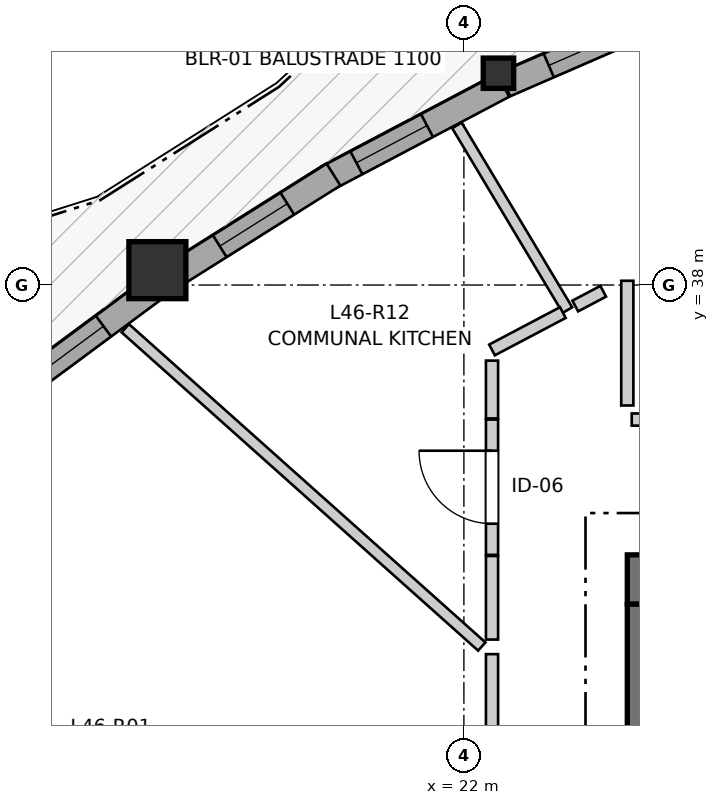
"""IFC4 building model, lengths in metres.
Left out: names, types, materials, properties, quantities, classifications, styles, units other than length and angle.
Written with IfcOpenShell. Run it as: python <this file> out.ifc"""

import sys

from ifc_helpers import new_model, si_unit, direction, frame, frame_2d, origin, origin_2d, place, context, subcontext, project, spatial, rectangle, i_section, extrude, source, transform, mapped, element, fill, save


model = new_model("IFC4")
c1 = context("Model", 3, precision=1e-05, world=origin(), true_north=direction((0.0, 1.0)))
c2 = subcontext(c1, "Body", "Model", "MODEL_VIEW")
j1 = project(units=[si_unit("LENGTHUNIT", "METRE"), si_unit("PLANEANGLEUNIT", "RADIAN")], contexts=[c1])
p1 = place(None, origin())
s1 = spatial("IfcSite", under=j1, at=p1, CompositionType="ELEMENT")
p2 = place(p1, origin())
s2 = spatial("IfcBuilding", under=s1, at=p2, CompositionType="ELEMENT")
p3 = place(p2, frame((0.0, 0.0, 155.4)))
s3 = spatial("IfcBuildingStorey", under=s2, at=p3, CompositionType="ELEMENT", Elevation=155.4)
p4 = place(p3, frame((36.55, 34.125, 0.0), z_axis=(0.0, 0.0, 1.0), x_axis=(-1.0, 0.0, 0.0)))
e1 = element("IfcWall", 1, at=p4, inside=s3, PredefinedType="SHEAR", context=c2, shape_type="SweptSolid", body=[
    extrude(rectangle(XDim=12.4, YDim=0.65, at=frame_2d((6.2, 0.0))), origin(), (0.0, 0.0, 1.0), 2.935),
])
p5 = place(p3, frame((24.475, 33.8, 0.0), z_axis=(0.0, 0.0, 1.0), x_axis=(0.0, -1.0, 0.0)))
e2 = element("IfcWall", 2, at=p5, inside=s3, PredefinedType="SHEAR", context=c2, shape_type="SweptSolid", body=[
    extrude(rectangle(XDim=15.6, YDim=0.65, at=frame_2d((7.8, 0.0))), origin(), (0.0, 0.0, 1.0), 2.935),
])
p6 = place(p5, frame((7.05, 0.0, 0.0)))
e3 = element("IfcOpeningElement", 3, at=p6, cuts=e2, PredefinedType="OPENING", context=c2, shape_type="SweptSolid", body=[
    extrude(rectangle(XDim=1.5, YDim=2.15, at=frame_2d((0.75, 1.075))), frame((0.0, 0.335, 0.0), z_axis=(0.0, -1.0, 0.0), x_axis=(1.0, 0.0, 0.0)), (0.0, 0.0, 1.0), 0.67),
])
p7 = place(p5, frame((3.52, 0.0, 0.0)))
e4 = element("IfcOpeningElement", 4, at=p7, cuts=e2, PredefinedType="OPENING", context=c2, shape_type="SweptSolid", body=[
    extrude(rectangle(XDim=0.86, YDim=2.05, at=frame_2d((0.43, 1.025))), frame((0.0, 0.335, 0.0), z_axis=(0.0, -1.0, 0.0), x_axis=(1.0, 0.0, 0.0)), (0.0, 0.0, 1.0), 0.67),
])
p8 = place(p5, frame((11.22, 0.0, 0.0)))
e5 = element("IfcOpeningElement", 5, at=p8, cuts=e2, PredefinedType="OPENING", context=c2, shape_type="SweptSolid", body=[
    extrude(rectangle(XDim=0.86, YDim=2.05, at=frame_2d((0.43, 1.025))), frame((0.0, 0.335, 0.0), z_axis=(0.0, -1.0, 0.0), x_axis=(1.0, 0.0, 0.0)), (0.0, 0.0, 1.0), 0.67),
])
m1 = source(origin(), c2, "Body", "SweptSolid", [
    extrude(i_section(OverallWidth=0.401, OverallDepth=0.399, WebThickness=0.023, FlangeThickness=0.036, FilletRadius=0.015, at=origin_2d()), origin(), (0.0, 0.0, 1.0), 2.935),
])
p9 = place(p3, frame((22.455, 40.786, 0.0), z_axis=(0.0, 0.0, 1.0), x_axis=(1.0, 0.0, 0.0)))
e6 = element("IfcColumn", 6, at=p9, inside=s3, PredefinedType="PILASTER", context=c2, shape_type="MappedRepresentation", body=[
    mapped(m1, transform((0.0, 0.0, 0.0), x_axis=(1.0, 0.0, 0.0), y_axis=(0.0, 1.0, 0.0), z_axis=(0.0, 0.0, 1.0), scale=1.0)),
])
m2 = source(origin(), c2, "Body", "SweptSolid", [
    extrude(rectangle(XDim=0.75, YDim=0.75, at=origin_2d()), origin(), (0.0, 0.0, 1.0), 2.935),
])
p10 = place(p3, frame((17.967, 38.195, 0.0), z_axis=(0.0, 0.0, 1.0), x_axis=(1.0, 0.0, 0.0)))
e7 = element("IfcColumn", 7, at=p10, inside=s3, PredefinedType="COLUMN", context=c2, shape_type="MappedRepresentation", body=[
    mapped(m2, transform((0.0, 0.0, 0.0), x_axis=(1.0, 0.0, 0.0), y_axis=(0.0, 1.0, 0.0), z_axis=(0.0, 0.0, 1.0), scale=1.0)),
])
p11 = place(p3, frame((24.949, 41.685, 0.0), z_axis=(0.0, 0.0, 1.0), x_axis=(-0.917112921707, -0.398627506373, 0.0)))
e8 = element("IfcWall", 8, at=p11, inside=s3, PredefinedType="SOLIDWALL", context=c2, shape_type="SweptSolid", body=[
    extrude(rectangle(XDim=2.625, YDim=0.34, at=frame_2d((1.313, 0.0))), origin(), (0.0, 0.0, 1.0), 2.515),
])
p12 = place(p11, frame((0.648, 0.0, 0.82)))
e9 = element("IfcOpeningElement", 9, at=p12, cuts=e8, PredefinedType="OPENING", context=c2, shape_type="SweptSolid", body=[
    extrude(rectangle(XDim=1.35, YDim=1.45, at=frame_2d((0.675, 0.725))), frame((0.0, 0.18, 0.0), z_axis=(0.0, -1.0, 0.0), x_axis=(1.0, 0.0, 0.0)), (0.0, 0.0, 1.0), 0.36),
])
p13 = place(p3, frame((22.517, 40.627, 0.0), z_axis=(0.0, 0.0, 1.0), x_axis=(-0.884374030812, -0.466778934427, 0.0)))
e10 = element("IfcWall", 10, at=p13, inside=s3, PredefinedType="SOLIDWALL", context=c2, shape_type="SweptSolid", body=[
    extrude(rectangle(XDim=2.611, YDim=0.34, at=frame_2d((1.306, 0.0))), origin(), (0.0, 0.0, 1.0), 2.515),
])
p14 = place(p13, frame((1.133, 0.0, 0.82)))
e11 = element("IfcOpeningElement", 11, at=p14, cuts=e10, PredefinedType="OPENING", context=c2, shape_type="SweptSolid", body=[
    extrude(rectangle(XDim=1.05, YDim=1.45, at=frame_2d((0.525, 0.725))), frame((0.0, 0.18, 0.0), z_axis=(0.0, -1.0, 0.0), x_axis=(1.0, 0.0, 0.0)), (0.0, 0.0, 1.0), 0.36),
])
p15 = place(p3, frame((20.284, 39.452, 0.0), z_axis=(0.0, 0.0, 1.0), x_axis=(-0.846415587119, -0.532522913951, 0.0)))
e12 = element("IfcWall", 12, at=p15, inside=s3, PredefinedType="SOLIDWALL", context=c2, shape_type="SweptSolid", body=[
    extrude(rectangle(XDim=2.476, YDim=0.34, at=frame_2d((1.238, 0.0))), origin(), (0.0, 0.0, 1.0), 2.515),
])
p16 = place(p15, frame((0.718, 0.0, 0.82)))
e13 = element("IfcOpeningElement", 13, at=p16, cuts=e12, PredefinedType="OPENING", context=c2, shape_type="SweptSolid", body=[
    extrude(rectangle(XDim=1.05, YDim=1.45, at=frame_2d((0.525, 0.725))), frame((0.0, 0.18, 0.0), z_axis=(0.0, -1.0, 0.0), x_axis=(1.0, 0.0, 0.0)), (0.0, 0.0, 1.0), 0.36),
])
p17 = place(p3, frame((17.944, 37.967, 0.0), z_axis=(0.0, 0.0, 1.0), x_axis=(-0.803795025682, -0.594906342788, 0.0)))
e14 = element("IfcWall", 14, at=p17, inside=s3, PredefinedType="SOLIDWALL", context=c2, shape_type="SweptSolid", body=[
    extrude(rectangle(XDim=2.491, YDim=0.34, at=frame_2d((1.245, 0.0))), origin(), (0.0, 0.0, 1.0), 2.515),
])
p18 = place(p17, frame((0.853, 0.0, 0.82)))
e15 = element("IfcOpeningElement", 15, at=p18, cuts=e14, PredefinedType="OPENING", context=c2, shape_type="SweptSolid", body=[
    extrude(rectangle(XDim=1.35, YDim=1.45, at=frame_2d((0.675, 0.725))), frame((0.0, 0.18, 0.0), z_axis=(0.0, -1.0, 0.0), x_axis=(1.0, 0.0, 0.0)), (0.0, 0.0, 1.0), 0.36),
])
p19 = place(p3, frame((24.208, 36.23, 0.0), z_axis=(0.0, 0.0, 1.0), x_axis=(1.0, 0.0, 0.0)))
e16 = element("IfcWall", 16, at=p19, inside=s3, PredefinedType="PARTITIONING", context=c2, shape_type="SweptSolid", body=[
    extrude(rectangle(XDim=5.832, YDim=0.16, at=frame_2d((2.916, 0.0))), origin(), (0.0, 0.0, 1.0), 2.935),
])
p20 = place(p19, frame((2.438, 0.0, 0.0)))
e17 = element("IfcOpeningElement", 17, at=p20, cuts=e16, PredefinedType="OPENING", context=c2, shape_type="SweptSolid", body=[
    extrude(rectangle(XDim=0.96, YDim=2.1, at=frame_2d((0.48, 1.05))), frame((0.0, 0.09, 0.0), z_axis=(0.0, -1.0, 0.0), x_axis=(1.0, 0.0, 0.0)), (0.0, 0.0, 1.0), 0.18),
])
p21 = place(p3, frame((22.37, 27.85, 0.0), z_axis=(0.0, 0.0, 1.0), x_axis=(0.0, 1.0, 0.0)))
e18 = element("IfcWall", 18, at=p21, inside=s3, PredefinedType="PARTITIONING", context=c2, shape_type="SweptSolid", body=[
    extrude(rectangle(XDim=5.294, YDim=0.16, at=frame_2d((2.647, 0.0))), origin(), (0.0, 0.0, 1.0), 2.935),
])
p22 = place(p21, frame((2.341, 0.0, 0.0)))
e19 = element("IfcOpeningElement", 19, at=p22, cuts=e18, PredefinedType="OPENING", context=c2, shape_type="SweptSolid", body=[
    extrude(rectangle(XDim=1.3, YDim=2.1, at=frame_2d((0.65, 1.05))), frame((0.0, 0.09, 0.0), z_axis=(0.0, -1.0, 0.0), x_axis=(1.0, 0.0, 0.0)), (0.0, 0.0, 1.0), 0.18),
])
p23 = place(p3, frame((22.37, 34.45, 0.0), z_axis=(0.0, 0.0, 1.0), x_axis=(0.0, 1.0, 0.0)))
e20 = element("IfcWall", 20, at=p23, inside=s3, PredefinedType="PARTITIONING", context=c2, shape_type="SweptSolid", body=[
    extrude(rectangle(XDim=1.78, YDim=0.16, at=frame_2d((0.89, 0.0))), origin(), (0.0, 0.0, 1.0), 2.935),
])
p24 = place(p23, frame((0.41, 0.0, 0.0)))
e21 = element("IfcOpeningElement", 21, at=p24, cuts=e20, PredefinedType="OPENING", context=c2, shape_type="SweptSolid", body=[
    extrude(rectangle(XDim=0.96, YDim=2.1, at=frame_2d((0.48, 1.05))), frame((0.0, 0.09, 0.0), z_axis=(0.0, -1.0, 0.0), x_axis=(1.0, 0.0, 0.0)), (0.0, 0.0, 1.0), 0.18),
])
p25 = place(p3, frame((17.545, 37.432, 0.0), z_axis=(0.0, 0.0, 1.0), x_axis=(0.745965905636, -0.665984134668, 0.0)))
e22 = element("IfcWall", 22, at=p25, inside=s3, PredefinedType="PARTITIONING", context=c2, shape_type="SweptSolid", body=[
    extrude(rectangle(XDim=6.288, YDim=0.145, at=frame_2d((3.144, 0.0))), origin(), (0.0, 0.0, 1.0), 2.935),
])
p26 = place(p3, frame((21.908, 40.1, 0.0), z_axis=(0.0, 0.0, 1.0), x_axis=(0.513582752497, -0.85804006686, 0.0)))
e23 = element("IfcWall", 23, at=p26, inside=s3, PredefinedType="PARTITIONING", context=c2, shape_type="SweptSolid", body=[
    extrude(rectangle(XDim=2.832, YDim=0.145, at=frame_2d((1.416, 0.0))), origin(), (0.0, 0.0, 1.0), 2.935),
])
p27 = place(p3, frame((24.15, 36.415, 0.0), z_axis=(0.0, 0.0, 1.0), x_axis=(0.0, 1.0, 0.0)))
e24 = element("IfcWall", 24, at=p27, inside=s3, PredefinedType="PARTITIONING", context=c2, shape_type="SweptSolid", body=[
    extrude(rectangle(XDim=1.641, YDim=0.16, at=frame_2d((0.82, 0.0))), origin(), (0.0, 0.0, 1.0), 2.935),
])
p28 = place(p3, frame((22.37, 33.336, 0.0), z_axis=(0.0, 0.0, 1.0), x_axis=(0.0, 1.0, 0.0)))
e25 = element("IfcWall", 25, at=p28, inside=s3, PredefinedType="PARTITIONING", context=c2, shape_type="SweptSolid", body=[
    extrude(rectangle(XDim=1.099, YDim=0.16, at=frame_2d((0.55, 0.0))), origin(), (0.0, 0.0, 1.0), 2.935),
])
p29 = place(p3, frame((22.37, 37.146, 0.0), z_axis=(0.0, 0.0, 1.0), x_axis=(0.884530854714, 0.46648168995, 0.0)))
e26 = element("IfcWall", 26, at=p29, inside=s3, PredefinedType="PARTITIONING", context=c2, shape_type="SweptSolid", body=[
    extrude(rectangle(XDim=1.053, YDim=0.16, at=frame_2d((0.527, 0.0))), origin(), (0.0, 0.0, 1.0), 2.543),
])
p30 = place(p3, frame((22.37, 36.245, 0.0), z_axis=(0.0, 0.0, 1.0), x_axis=(0.0, 1.0, 0.0)))
e27 = element("IfcWall", 27, at=p30, inside=s3, PredefinedType="PARTITIONING", context=c2, shape_type="SweptSolid", body=[
    extrude(rectangle(XDim=0.76, YDim=0.16, at=frame_2d((0.38, 0.0))), origin(), (0.0, 0.0, 1.0), 2.935),
])
p31 = place(p3, frame((23.465, 37.724, 0.0), z_axis=(0.0, 0.0, 1.0), x_axis=(0.884344349775, 0.466835164722, 0.0)))
e28 = element("IfcWall", 28, at=p31, inside=s3, PredefinedType="PARTITIONING", context=c2, shape_type="SweptSolid", body=[
    extrude(rectangle(XDim=0.416, YDim=0.16, at=frame_2d((0.208, 0.0))), origin(), (0.0, 0.0, 1.0), 2.543),
])
m3 = source(origin(), c2, "Body", "SweptSolid", [
    extrude(rectangle(XDim=1.35, YDim=1.45, at=frame_2d((0.675, 0.725))), frame((0.0, 0.03, 0.0), z_axis=(0.0, -1.0, 0.0), x_axis=(1.0, 0.0, 0.0)), (0.0, 0.0, 1.0), 0.06),
])
p32 = place(p12, origin())
e29 = element("IfcWindow", 29, at=p32, inside=s3, PartitioningType="SINGLE_PANEL", PredefinedType="WINDOW", context=c2, shape_type="MappedRepresentation", body=[
    mapped(m3, transform((0.0, 0.0, 0.0), x_axis=(1.0, 0.0, 0.0), y_axis=(0.0, 1.0, 0.0), z_axis=(0.0, 0.0, 1.0), scale=1.0)),
])
fill(e9, e29)
m4 = source(origin(), c2, "Body", "SweptSolid", [
    extrude(rectangle(XDim=1.05, YDim=1.45, at=frame_2d((0.525, 0.725))), frame((0.0, 0.03, 0.0), z_axis=(0.0, -1.0, 0.0), x_axis=(1.0, 0.0, 0.0)), (0.0, 0.0, 1.0), 0.06),
])
p33 = place(p14, origin())
e30 = element("IfcWindow", 30, at=p33, inside=s3, PartitioningType="SINGLE_PANEL", PredefinedType="WINDOW", context=c2, shape_type="MappedRepresentation", body=[
    mapped(m4, transform((0.0, 0.0, 0.0), x_axis=(1.0, 0.0, 0.0), y_axis=(0.0, 1.0, 0.0), z_axis=(0.0, 0.0, 1.0), scale=1.0)),
])
fill(e11, e30)
p34 = place(p16, origin())
e31 = element("IfcWindow", 31, at=p34, inside=s3, PartitioningType="SINGLE_PANEL", PredefinedType="WINDOW", context=c2, shape_type="MappedRepresentation", body=[
    mapped(m4, transform((0.0, 0.0, 0.0), x_axis=(1.0, 0.0, 0.0), y_axis=(0.0, 1.0, 0.0), z_axis=(0.0, 0.0, 1.0), scale=1.0)),
])
fill(e13, e31)
p35 = place(p18, origin())
e32 = element("IfcWindow", 32, at=p35, inside=s3, PartitioningType="SINGLE_PANEL", PredefinedType="WINDOW", context=c2, shape_type="MappedRepresentation", body=[
    mapped(m3, transform((0.0, 0.0, 0.0), x_axis=(1.0, 0.0, 0.0), y_axis=(0.0, 1.0, 0.0), z_axis=(0.0, 0.0, 1.0), scale=1.0)),
])
fill(e15, e32)
m5 = source(origin(), c2, "Body", "SweptSolid", [
    extrude(rectangle(XDim=0.96, YDim=2.1, at=frame_2d((0.48, 1.05))), frame((0.0, 0.025, 0.0), z_axis=(0.0, -1.0, 0.0), x_axis=(1.0, 0.0, 0.0)), (0.0, 0.0, 1.0), 0.05),
])
p36 = place(p24, origin())
e33 = element("IfcDoor", 33, at=p36, inside=s3, OperationType="SINGLE_SWING_RIGHT", PredefinedType="DOOR", context=c2, shape_type="MappedRepresentation", body=[
    mapped(m5, transform((0.0, 0.0, 0.0), x_axis=(1.0, 0.0, 0.0), y_axis=(0.0, 1.0, 0.0), z_axis=(0.0, 0.0, 1.0), scale=1.0)),
])
fill(e21, e33)
save(model, sys.argv[1])
